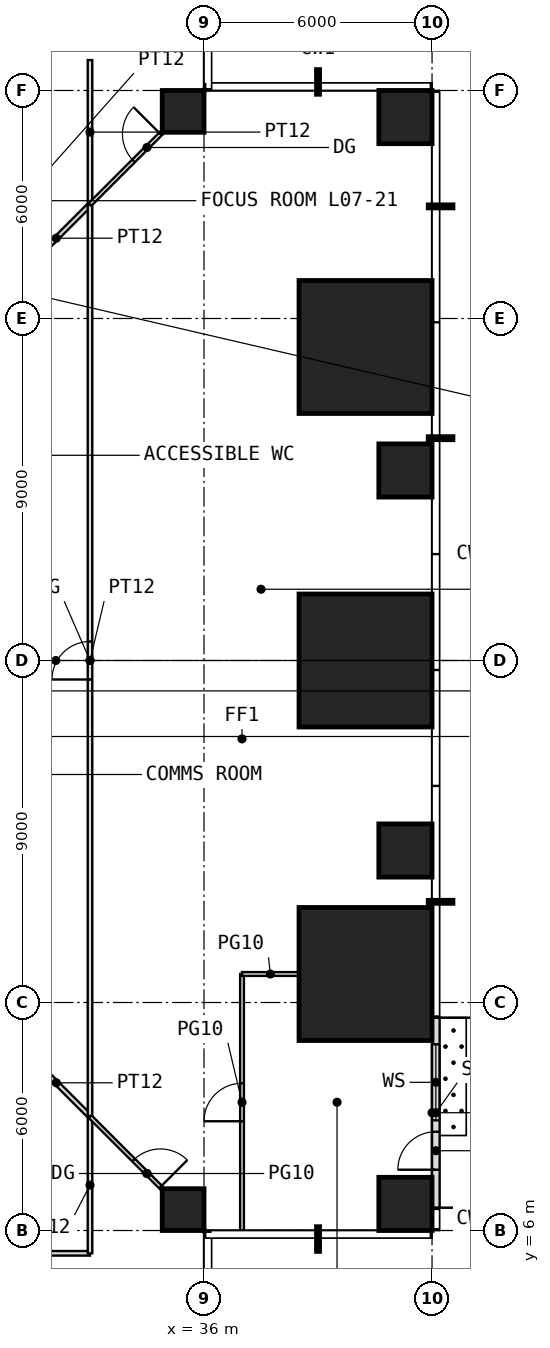
"""IFC4 building model, lengths in metres.
Left out: names, types, materials, properties, quantities, classifications, styles, units other than length and angle.
Written with IfcOpenShell. Run it as: python <this file> out.ifc"""

import sys

from ifc_helpers import new_model, si_unit, direction, frame, frame_2d, origin, origin_2d, place, context, subcontext, project, spatial, rectangle, extrude, element, fill, save


model = new_model("IFC4")
c1 = context("Model", 3, precision=1e-05, world=origin(), true_north=direction((0.0, 1.0)))
c2 = subcontext(c1, "Body", "Model", "MODEL_VIEW")
j1 = project(units=[si_unit("LENGTHUNIT", "METRE"), si_unit("PLANEANGLEUNIT", "RADIAN")], contexts=[c1])
p1 = place(None, origin())
s1 = spatial("IfcSite", under=j1, at=p1, CompositionType="ELEMENT")
p2 = place(p1, origin())
s2 = spatial("IfcBuilding", under=s1, at=p2, CompositionType="ELEMENT")
p3 = place(p2, frame((0.0, 0.0, 34.5)))
s3 = spatial("IfcBuildingStorey", under=s2, at=p3, CompositionType="ELEMENT", Elevation=34.5)
p4 = place(p3, frame((35.45, 6.55, 0.0), z_axis=(0.0, 0.0, 1.0), x_axis=(1.0, 0.0, 0.0)))
e1 = element("IfcColumn", 1, at=p4, inside=s3, PredefinedType="COLUMN", context=c2, shape_type="SweptSolid", body=[
    extrude(rectangle(XDim=1.1, YDim=1.1, at=origin_2d()), origin(), (0.0, 0.0, 1.0), 4.0),
])
p5 = place(p3, frame((41.3, 6.7, 0.0), z_axis=(0.0, 0.0, 1.0), x_axis=(1.0, 0.0, 0.0)))
e2 = element("IfcColumn", 2, at=p5, inside=s3, PredefinedType="COLUMN", context=c2, shape_type="SweptSolid", body=[
    extrude(rectangle(XDim=1.4, YDim=1.4, at=origin_2d()), origin(), (0.0, 0.0, 1.0), 4.0),
])
p6 = place(p3, frame((40.25, 12.75, 0.0), z_axis=(0.0, 0.0, 1.0), x_axis=(1.0, 0.0, 0.0)))
e3 = element("IfcColumn", 3, at=p6, inside=s3, PredefinedType="COLUMN", context=c2, shape_type="SweptSolid", body=[
    extrude(rectangle(XDim=3.5, YDim=3.5, at=origin_2d()), origin(), (0.0, 0.0, 1.0), 4.0),
])
p7 = place(p3, frame((41.3, 16.0, 0.0), z_axis=(0.0, 0.0, 1.0), x_axis=(1.0, 0.0, 0.0)))
e4 = element("IfcColumn", 4, at=p7, inside=s3, PredefinedType="COLUMN", context=c2, shape_type="SweptSolid", body=[
    extrude(rectangle(XDim=1.4, YDim=1.4, at=origin_2d()), origin(), (0.0, 0.0, 1.0), 4.0),
])
p8 = place(p3, frame((40.25, 21.0, 0.0), z_axis=(0.0, 0.0, 1.0), x_axis=(1.0, 0.0, 0.0)))
e5 = element("IfcColumn", 5, at=p8, inside=s3, PredefinedType="COLUMN", context=c2, shape_type="SweptSolid", body=[
    extrude(rectangle(XDim=3.5, YDim=3.5, at=origin_2d()), origin(), (0.0, 0.0, 1.0), 4.0),
])
p9 = place(p3, frame((41.3, 26.0, 0.0), z_axis=(0.0, 0.0, 1.0), x_axis=(1.0, 0.0, 0.0)))
e6 = element("IfcColumn", 6, at=p9, inside=s3, PredefinedType="COLUMN", context=c2, shape_type="SweptSolid", body=[
    extrude(rectangle(XDim=1.4, YDim=1.4, at=origin_2d()), origin(), (0.0, 0.0, 1.0), 4.0),
])
p10 = place(p3, frame((40.25, 29.25, 0.0), z_axis=(0.0, 0.0, 1.0), x_axis=(1.0, 0.0, 0.0)))
e7 = element("IfcColumn", 7, at=p10, inside=s3, PredefinedType="COLUMN", context=c2, shape_type="SweptSolid", body=[
    extrude(rectangle(XDim=3.5, YDim=3.5, at=origin_2d()), origin(), (0.0, 0.0, 1.0), 4.0),
])
p11 = place(p3, frame((35.45, 35.45, 0.0), z_axis=(0.0, 0.0, 1.0), x_axis=(1.0, 0.0, 0.0)))
e8 = element("IfcColumn", 8, at=p11, inside=s3, PredefinedType="COLUMN", context=c2, shape_type="SweptSolid", body=[
    extrude(rectangle(XDim=1.1, YDim=1.1, at=origin_2d()), origin(), (0.0, 0.0, 1.0), 4.0),
])
p12 = place(p3, frame((41.3, 35.3, 0.0), z_axis=(0.0, 0.0, 1.0), x_axis=(1.0, 0.0, 0.0)))
e9 = element("IfcColumn", 9, at=p12, inside=s3, PredefinedType="COLUMN", context=c2, shape_type="SweptSolid", body=[
    extrude(rectangle(XDim=1.4, YDim=1.4, at=origin_2d()), origin(), (0.0, 0.0, 1.0), 4.0),
])
p13 = place(p3, frame((42.1, 6.6, 0.0), z_axis=(0.0, 0.0, 1.0), x_axis=(0.0, 1.0, 0.0)))
e10 = element("IfcWall", 10, at=p13, inside=s3, PredefinedType="USERDEFINED", context=c2, shape_type="SweptSolid", body=[
    extrude(rectangle(XDim=5.0, YDim=0.2, at=frame_2d((2.5, 0.0))), origin(), (0.0, 0.0, 1.0), 3.75),
])
p14 = place(p13, frame((1.0, 0.0, 0.0)))
e11 = element("IfcOpeningElement", 11, at=p14, cuts=e10, PredefinedType="OPENING", context=c2, shape_type="SweptSolid", body=[
    extrude(rectangle(XDim=1.0, YDim=2.4, at=frame_2d((0.5, 1.2))), frame((0.0, 0.11, 0.0), z_axis=(0.0, -1.0, 0.0), x_axis=(1.0, 0.0, 0.0)), (0.0, 0.0, 1.0), 0.22),
])
p15 = place(p13, frame((2.3, 0.0, 0.3)))
e12 = element("IfcOpeningElement", 12, at=p15, cuts=e10, PredefinedType="OPENING", context=c2, shape_type="SweptSolid", body=[
    extrude(rectangle(XDim=2.0, YDim=2.7, at=frame_2d((1.0, 1.35))), frame((0.0, 0.11, 0.0), z_axis=(0.0, -1.0, 0.0), x_axis=(1.0, 0.0, 0.0)), (0.0, 0.0, 1.0), 0.22),
])
p16 = place(p3, frame((6.0, 5.4, 0.0), z_axis=(0.0, 0.0, 1.0), x_axis=(1.0, 0.0, 0.0)))
e13 = element("IfcWall", 13, at=p16, inside=s3, PredefinedType="PARTITIONING", context=c2, shape_type="SweptSolid", body=[
    extrude(rectangle(XDim=27.0, YDim=0.12, at=frame_2d((13.5, 0.0))), origin(), (0.0, 0.0, 1.0), 3.75),
])
p17 = place(p16, frame((14.8, 0.0, 0.0)))
e14 = element("IfcOpeningElement", 14, at=p17, cuts=e13, PredefinedType="OPENING", context=c2, shape_type="SweptSolid", body=[
    extrude(rectangle(XDim=1.0, YDim=2.4, at=frame_2d((0.5, 1.2))), frame((0.0, 0.07, 0.0), z_axis=(0.0, -1.0, 0.0), x_axis=(1.0, 0.0, 0.0)), (0.0, 0.0, 1.0), 0.14),
])
for number, where, z_axis, x_axis in (
    (15, (31.235, 10.765, 0.0), (0.0, 0.0, 1.0), (0.707, -0.707, 0.0)),
    (16, (31.235, 31.235, 0.0), (0.0, 0.0, 1.0), (0.707, 0.707, 0.0)),
):
    element("IfcWall", number, at=place(p3, frame(where, z_axis=z_axis, x_axis=x_axis)), inside=s3, PredefinedType="PARTITIONING", context=c2, shape_type="SweptSolid", body=[
        extrude(rectangle(XDim=2.481, YDim=0.12, at=frame_2d((1.241, 0.0))), origin(), (0.0, 0.0, 1.0), 3.75),
    ])
p18 = place(p3, frame((33.0, 5.4, 0.0), z_axis=(0.0, 0.0, 1.0), x_axis=(0.0, 1.0, 0.0)))
e17 = element("IfcWall", 17, at=p18, inside=s3, PredefinedType="PARTITIONING", context=c2, shape_type="SweptSolid", body=[
    extrude(rectangle(XDim=3.59, YDim=0.12, at=frame_2d((1.795, 0.0))), origin(), (0.0, 0.0, 1.0), 3.75),
])
p19 = place(p3, frame((33.0, 9.01, 0.0), z_axis=(0.0, 0.0, 1.0), x_axis=(0.0, 1.0, 0.0)))
e18 = element("IfcWall", 18, at=p19, inside=s3, PredefinedType="PARTITIONING", context=c2, shape_type="SweptSolid", body=[
    extrude(rectangle(XDim=23.98, YDim=0.12, at=frame_2d((11.99, 0.0))), origin(), (0.0, 0.0, 1.0), 3.75),
])
p20 = place(p19, frame((11.49, 0.0, 0.0)))
e19 = element("IfcOpeningElement", 19, at=p20, cuts=e18, PredefinedType="OPENING", context=c2, shape_type="SweptSolid", body=[
    extrude(rectangle(XDim=1.0, YDim=2.4, at=frame_2d((0.5, 1.2))), frame((0.0, 0.07, 0.0), z_axis=(0.0, -1.0, 0.0), x_axis=(1.0, 0.0, 0.0)), (0.0, 0.0, 1.0), 0.14),
])
p21 = place(p3, frame((33.0, 33.01, 0.0), z_axis=(0.0, 0.0, 1.0), x_axis=(0.0, 1.0, 0.0)))
e20 = element("IfcWall", 20, at=p21, inside=s3, PredefinedType="PARTITIONING", context=c2, shape_type="SweptSolid", body=[
    extrude(rectangle(XDim=3.79, YDim=0.12, at=frame_2d((1.895, 0.0))), origin(), (0.0, 0.0, 1.0), 3.75),
])
p22 = place(p3, frame((37.0, 6.0, 0.0), z_axis=(0.0, 0.0, 1.0), x_axis=(0.0, 1.0, 0.0)))
e21 = element("IfcWall", 21, at=p22, inside=s3, PredefinedType="PARTITIONING", context=c2, shape_type="SweptSolid", body=[
    extrude(rectangle(XDim=6.75, YDim=0.1, at=frame_2d((3.375, 0.0))), origin(), (0.0, 0.0, 1.0), 3.75),
])
p23 = place(p22, frame((2.875, 0.0, 0.0)))
e22 = element("IfcOpeningElement", 22, at=p23, cuts=e21, PredefinedType="OPENING", context=c2, shape_type="SweptSolid", body=[
    extrude(rectangle(XDim=1.0, YDim=2.4, at=frame_2d((0.5, 1.2))), frame((0.0, 0.06, 0.0), z_axis=(0.0, -1.0, 0.0), x_axis=(1.0, 0.0, 0.0)), (0.0, 0.0, 1.0), 0.12),
])
p24 = place(p3, frame((37.0, 12.75, 0.0), z_axis=(0.0, 0.0, 1.0), x_axis=(1.0, 0.0, 0.0)))
e23 = element("IfcWall", 23, at=p24, inside=s3, PredefinedType="PARTITIONING", context=c2, shape_type="SweptSolid", body=[
    extrude(rectangle(XDim=1.49, YDim=0.1, at=frame_2d((0.745, 0.0))), origin(), (0.0, 0.0, 1.0), 3.75),
])
p25 = place(p3, frame((33.0, 9.0, 0.0), z_axis=(0.0, 0.0, 1.0), x_axis=(0.707106781187, -0.707106781187, 0.0)))
e24 = element("IfcWall", 24, at=p25, inside=s3, PredefinedType="PARTITIONING", context=c2, shape_type="SweptSolid", body=[
    extrude(rectangle(XDim=4.243, YDim=0.1, at=frame_2d((2.121, 0.0))), origin(), (0.0, 0.0, 1.0), 3.75),
])
p26 = place(p25, frame((1.621, 0.0, 0.0)))
e25 = element("IfcOpeningElement", 25, at=p26, cuts=e24, PredefinedType="OPENING", context=c2, shape_type="SweptSolid", body=[
    extrude(rectangle(XDim=1.0, YDim=2.4, at=frame_2d((0.5, 1.2))), frame((0.0, 0.06, 0.0), z_axis=(0.0, -1.0, 0.0), x_axis=(1.0, 0.0, 0.0)), (0.0, 0.0, 1.0), 0.12),
])
p27 = place(p3, frame((33.0, 33.0, 0.0), z_axis=(0.0, 0.0, 1.0), x_axis=(0.707106781187, 0.707106781187, 0.0)))
e26 = element("IfcWall", 26, at=p27, inside=s3, PredefinedType="PARTITIONING", context=c2, shape_type="SweptSolid", body=[
    extrude(rectangle(XDim=4.243, YDim=0.1, at=frame_2d((2.121, 0.0))), origin(), (0.0, 0.0, 1.0), 3.75),
])
p28 = place(p27, frame((1.621, 0.0, 0.0)))
e27 = element("IfcOpeningElement", 27, at=p28, cuts=e26, PredefinedType="OPENING", context=c2, shape_type="SweptSolid", body=[
    extrude(rectangle(XDim=1.0, YDim=2.4, at=frame_2d((0.5, 1.2))), frame((0.0, 0.06, 0.0), z_axis=(0.0, -1.0, 0.0), x_axis=(1.0, 0.0, 0.0)), (0.0, 0.0, 1.0), 0.12),
])
p29 = place(p14, origin())
e28 = element("IfcDoor", 28, at=p29, inside=s3, OperationType="SINGLE_SWING_LEFT", PredefinedType="DOOR", context=c2, shape_type="SweptSolid", body=[
    extrude(rectangle(XDim=1.0, YDim=2.4, at=frame_2d((0.5, 1.2))), frame((0.0, 0.025, 0.0), z_axis=(0.0, -1.0, 0.0), x_axis=(1.0, 0.0, 0.0)), (0.0, 0.0, 1.0), 0.05),
])
fill(e11, e28)
p30 = place(p15, origin())
e29 = element("IfcWindow", 29, at=p30, inside=s3, PartitioningType="SINGLE_PANEL", PredefinedType="WINDOW", context=c2, shape_type="SweptSolid", body=[
    extrude(rectangle(XDim=2.0, YDim=2.7, at=frame_2d((1.0, 1.35))), frame((0.0, 0.03, 0.0), z_axis=(0.0, -1.0, 0.0), x_axis=(1.0, 0.0, 0.0)), (0.0, 0.0, 1.0), 0.06),
])
fill(e12, e29)
p31 = place(p23, origin())
e30 = element("IfcDoor", 30, at=p31, inside=s3, OperationType="SINGLE_SWING_LEFT", PredefinedType="DOOR", context=c2, shape_type="SweptSolid", body=[
    extrude(rectangle(XDim=1.0, YDim=2.4, at=frame_2d((0.5, 1.2))), frame((0.0, 0.025, 0.0), z_axis=(0.0, -1.0, 0.0), x_axis=(1.0, 0.0, 0.0)), (0.0, 0.0, 1.0), 0.05),
])
fill(e22, e30)
p32 = place(p20, origin())
e31 = element("IfcDoor", 31, at=p32, inside=s3, OperationType="SINGLE_SWING_LEFT", PredefinedType="DOOR", context=c2, shape_type="SweptSolid", body=[
    extrude(rectangle(XDim=1.0, YDim=2.4, at=frame_2d((0.5, 1.2))), frame((0.0, 0.025, 0.0), z_axis=(0.0, -1.0, 0.0), x_axis=(1.0, 0.0, 0.0)), (0.0, 0.0, 1.0), 0.05),
])
fill(e19, e31)
p33 = place(p26, origin())
e32 = element("IfcDoor", 32, at=p33, inside=s3, OperationType="SINGLE_SWING_RIGHT", PredefinedType="DOOR", context=c2, shape_type="SweptSolid", body=[
    extrude(rectangle(XDim=1.0, YDim=2.4, at=frame_2d((0.5, 1.2))), frame((0.0, 0.025, 0.0), z_axis=(0.0, -1.0, 0.0), x_axis=(1.0, 0.0, 0.0)), (0.0, 0.0, 1.0), 0.05),
])
fill(e25, e32)
p34 = place(p28, origin())
e33 = element("IfcDoor", 33, at=p34, inside=s3, OperationType="SINGLE_SWING_RIGHT", PredefinedType="DOOR", context=c2, shape_type="SweptSolid", body=[
    extrude(rectangle(XDim=1.0, YDim=2.4, at=frame_2d((0.5, 1.2))), frame((0.0, 0.025, 0.0), z_axis=(0.0, -1.0, 0.0), x_axis=(1.0, 0.0, 0.0)), (0.0, 0.0, 1.0), 0.05),
])
fill(e27, e33)
save(model, sys.argv[1])
